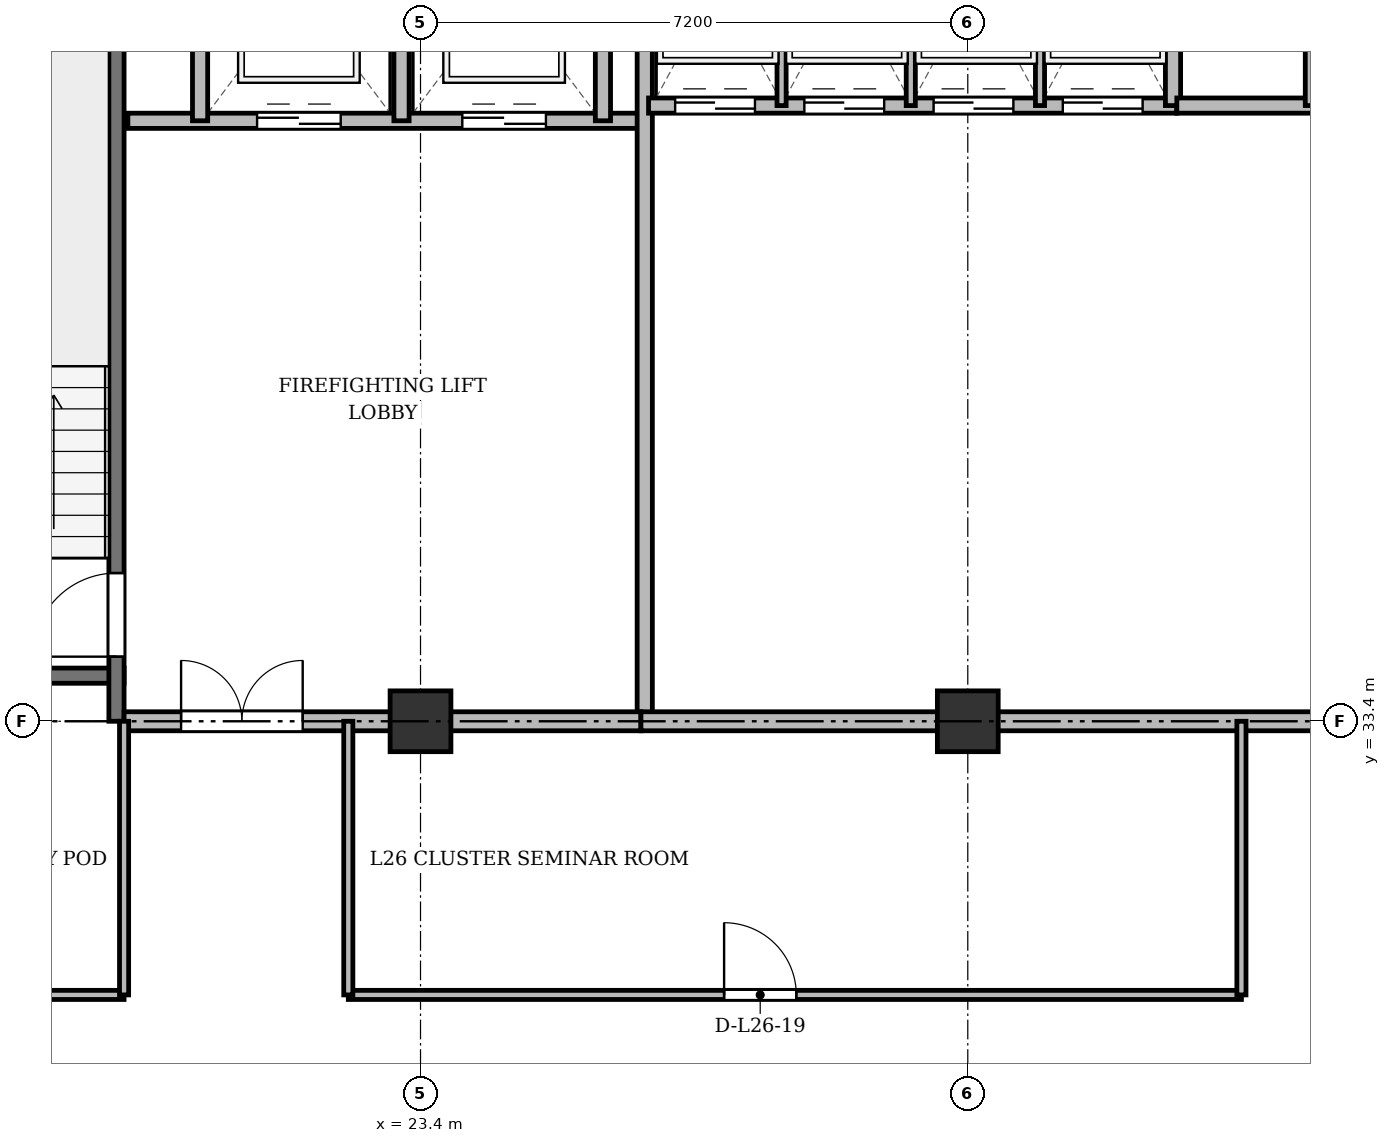
"""IFC4 building model, lengths in metres.
Left out: names, types, materials, properties, quantities, classifications, styles, units other than length and angle.
Written with IfcOpenShell. Run it as: python <this file> out.ifc"""

import sys

from ifc_helpers import new_model, si_unit, direction, frame, frame_2d, origin, origin_2d, place, context, subcontext, project, spatial, rectangle, extrude, source, transform, mapped, element, fill, save


model = new_model("IFC4")
c1 = context("Model", 3, precision=1e-05, world=origin(), true_north=direction((0.0, 1.0)))
c2 = subcontext(c1, "Body", "Model", "MODEL_VIEW")
j1 = project(units=[si_unit("LENGTHUNIT", "METRE"), si_unit("PLANEANGLEUNIT", "RADIAN")], contexts=[c1])
p1 = place(None, origin())
s1 = spatial("IfcSite", under=j1, at=p1, CompositionType="ELEMENT")
p2 = place(p1, origin())
s2 = spatial("IfcBuilding", under=s1, at=p2, CompositionType="ELEMENT")
p3 = place(p2, frame((0.0, 0.0, 103.3)))
s3 = spatial("IfcBuildingStorey", under=s2, at=p3, CompositionType="ELEMENT", Elevation=103.3)
m1 = source(origin(), c2, "Body", "SweptSolid", [
    extrude(rectangle(XDim=0.8, YDim=0.8, at=origin_2d()), origin(), (0.0, 0.0, 1.0), 3.6),
])
for number, where, z_axis, x_axis in (
    (1, (23.4, 33.4, 0.0), (0.0, 0.0, 1.0), (1.0, 0.0, 0.0)),
    (2, (30.6, 33.4, 0.0), (0.0, 0.0, 1.0), (1.0, 0.0, 0.0)),
):
    element("IfcColumn", number, at=place(p3, frame(where, z_axis=z_axis, x_axis=x_axis)), inside=s3, PredefinedType="COLUMN", context=c2, shape_type="MappedRepresentation", body=[
        mapped(m1, transform((0.0, 0.0, 0.0), x_axis=(1.0, 0.0, 0.0), y_axis=(0.0, 1.0, 0.0), z_axis=(0.0, 0.0, 1.0), scale=1.0)),
    ])
p4 = place(p3, frame((16.1, 34.0, 0.0), z_axis=(0.0, 0.0, 1.0), x_axis=(1.0, 0.0, 0.0)))
e3 = element("IfcWall", 3, at=p4, inside=s3, PredefinedType="SHEAR", context=c2, shape_type="SweptSolid", body=[
    extrude(rectangle(XDim=3.4, YDim=0.2, at=frame_2d((1.7, 0.0))), origin(), (0.0, 0.0, 1.0), 3.34),
])
p5 = place(p3, frame((19.4, 33.4, 0.0), z_axis=(0.0, 0.0, 1.0), x_axis=(0.0, 1.0, 0.0)))
e4 = element("IfcWall", 4, at=p5, inside=s3, PredefinedType="SHEAR", context=c2, shape_type="SweptSolid", body=[
    extrude(rectangle(XDim=11.1, YDim=0.2, at=frame_2d((5.55, 0.0))), origin(), (0.0, 0.0, 1.0), 3.34),
])
p6 = place(p5, frame((0.85, 0.0, 0.0)))
e5 = element("IfcOpeningElement", 5, at=p6, cuts=e4, PredefinedType="OPENING", context=c2, shape_type="SweptSolid", body=[
    extrude(rectangle(XDim=1.1, YDim=2.15, at=frame_2d((0.55, 1.075))), frame((0.0, 0.11, 0.0), z_axis=(0.0, -1.0, 0.0), x_axis=(1.0, 0.0, 0.0)), (0.0, 0.0, 1.0), 0.22),
])
p7 = place(p3, frame((19.55, 41.3, 0.0), z_axis=(0.0, 0.0, 1.0), x_axis=(1.0, 0.0, 0.0)))
e6 = element("IfcWall", 6, at=p7, inside=s3, PredefinedType="SOLIDWALL", context=c2, shape_type="SweptSolid", body=[
    extrude(rectangle(XDim=6.75, YDim=0.2, at=frame_2d((3.375, 0.0))), origin(), (0.0, 0.0, 1.0), 3.34),
])
p8 = place(p7, frame((1.7, 0.0, 0.0)))
e7 = element("IfcOpeningElement", 7, at=p8, cuts=e6, PredefinedType="OPENING", context=c2, shape_type="SweptSolid", body=[
    extrude(rectangle(XDim=1.1, YDim=2.15, at=frame_2d((0.55, 1.075))), frame((0.0, 0.11, 0.0), z_axis=(0.0, -1.0, 0.0), x_axis=(1.0, 0.0, 0.0)), (0.0, 0.0, 1.0), 0.22),
])
p9 = place(p7, frame((4.4, 0.0, 0.0)))
e8 = element("IfcOpeningElement", 8, at=p9, cuts=e6, PredefinedType="OPENING", context=c2, shape_type="SweptSolid", body=[
    extrude(rectangle(XDim=1.1, YDim=2.15, at=frame_2d((0.55, 1.075))), frame((0.0, 0.11, 0.0), z_axis=(0.0, -1.0, 0.0), x_axis=(1.0, 0.0, 0.0)), (0.0, 0.0, 1.0), 0.22),
])
for number, where, z_axis, x_axis in (
    (9, (20.5, 41.3, 0.0), (0.0, 0.0, 1.0), (0.0, 1.0, 0.0)),
    (10, (23.15, 41.3, 0.0), (0.0, 0.0, 1.0), (0.0, 1.0, 0.0)),
    (11, (25.8, 41.3, 0.0), (0.0, 0.0, 1.0), (0.0, 1.0, 0.0)),
):
    element("IfcWall", number, at=place(p3, frame(where, z_axis=z_axis, x_axis=x_axis)), inside=s3, PredefinedType="SOLIDWALL", context=c2, shape_type="SweptSolid", body=[
        extrude(rectangle(XDim=3.4, YDim=0.2, at=frame_2d((1.7, 0.0))), origin(), (0.0, 0.0, 1.0), 3.34),
    ])
p10 = place(p3, frame((26.35, 33.4, 0.0), z_axis=(0.0, 0.0, 1.0), x_axis=(0.0, 1.0, 0.0)))
e12 = element("IfcWall", 12, at=p10, inside=s3, PredefinedType="SOLIDWALL", context=c2, shape_type="SweptSolid", body=[
    extrude(rectangle(XDim=11.3, YDim=0.2, at=frame_2d((5.65, 0.0))), origin(), (0.0, 0.0, 1.0), 2.752),
])
p11 = place(p3, frame((19.5, 33.4, 0.0), z_axis=(0.0, 0.0, 1.0), x_axis=(1.0, 0.0, 0.0)))
e13 = element("IfcWall", 13, at=p11, inside=s3, PredefinedType="PARTITIONING", context=c2, shape_type="SweptSolid", body=[
    extrude(rectangle(XDim=6.8, YDim=0.25, at=frame_2d((3.4, 0.0))), origin(), (0.0, 0.0, 1.0), 2.752),
])
p12 = place(p11, frame((0.75, 0.0, 0.0)))
e14 = element("IfcOpeningElement", 14, at=p12, cuts=e13, PredefinedType="OPENING", context=c2, shape_type="SweptSolid", body=[
    extrude(rectangle(XDim=1.6, YDim=2.2, at=frame_2d((0.8, 1.1))), frame((0.0, 0.135, 0.0), z_axis=(0.0, -1.0, 0.0), x_axis=(1.0, 0.0, 0.0)), (0.0, 0.0, 1.0), 0.27),
])
p13 = place(p3, frame((26.4, 41.5, 0.0), z_axis=(0.0, 0.0, 1.0), x_axis=(1.0, 0.0, 0.0)))
e15 = element("IfcWall", 15, at=p13, inside=s3, PredefinedType="SOLIDWALL", context=c2, shape_type="SweptSolid", body=[
    extrude(rectangle(XDim=6.95, YDim=0.2, at=frame_2d((3.475, 0.0))), origin(), (0.0, 0.0, 1.0), 3.34),
])
p14 = place(p13, frame((0.35, 0.0, 0.0)))
e16 = element("IfcOpeningElement", 16, at=p14, cuts=e15, PredefinedType="OPENING", context=c2, shape_type="SweptSolid", body=[
    extrude(rectangle(XDim=1.05, YDim=2.15, at=frame_2d((0.525, 1.075))), frame((0.0, 0.11, 0.0), z_axis=(0.0, -1.0, 0.0), x_axis=(1.0, 0.0, 0.0)), (0.0, 0.0, 1.0), 0.22),
])
p15 = place(p13, frame((2.05, 0.0, 0.0)))
e17 = element("IfcOpeningElement", 17, at=p15, cuts=e15, PredefinedType="OPENING", context=c2, shape_type="SweptSolid", body=[
    extrude(rectangle(XDim=1.05, YDim=2.15, at=frame_2d((0.525, 1.075))), frame((0.0, 0.11, 0.0), z_axis=(0.0, -1.0, 0.0), x_axis=(1.0, 0.0, 0.0)), (0.0, 0.0, 1.0), 0.22),
])
p16 = place(p13, frame((3.75, 0.0, 0.0)))
e18 = element("IfcOpeningElement", 18, at=p16, cuts=e15, PredefinedType="OPENING", context=c2, shape_type="SweptSolid", body=[
    extrude(rectangle(XDim=1.05, YDim=2.15, at=frame_2d((0.525, 1.075))), frame((0.0, 0.11, 0.0), z_axis=(0.0, -1.0, 0.0), x_axis=(1.0, 0.0, 0.0)), (0.0, 0.0, 1.0), 0.22),
])
p17 = place(p13, frame((5.45, 0.0, 0.0)))
e19 = element("IfcOpeningElement", 19, at=p17, cuts=e15, PredefinedType="OPENING", context=c2, shape_type="SweptSolid", body=[
    extrude(rectangle(XDim=1.05, YDim=2.15, at=frame_2d((0.525, 1.075))), frame((0.0, 0.11, 0.0), z_axis=(0.0, -1.0, 0.0), x_axis=(1.0, 0.0, 0.0)), (0.0, 0.0, 1.0), 0.22),
])
p18 = place(p3, frame((33.3, 41.5, 0.0), z_axis=(0.0, 0.0, 1.0), x_axis=(0.0, 1.0, 0.0)))
e20 = element("IfcWall", 20, at=p18, inside=s3, PredefinedType="SOLIDWALL", context=c2, shape_type="SweptSolid", body=[
    extrude(rectangle(XDim=3.2, YDim=0.2, at=frame_2d((1.6, 0.0))), origin(), (0.0, 0.0, 1.0), 3.34),
])
for number, where, z_axis, x_axis in (
    (21, (28.15, 41.5, 0.0), (0.0, 0.0, 1.0), (0.0, 1.0, 0.0)),
    (22, (29.85, 41.5, 0.0), (0.0, 0.0, 1.0), (0.0, 1.0, 0.0)),
    (23, (31.55, 41.5, 0.0), (0.0, 0.0, 1.0), (0.0, 1.0, 0.0)),
):
    element("IfcWall", number, at=place(p3, frame(where, z_axis=z_axis, x_axis=x_axis)), inside=s3, PredefinedType="PARTITIONING", context=c2, shape_type="SweptSolid", body=[
        extrude(rectangle(XDim=3.2, YDim=0.12, at=frame_2d((1.6, 0.0))), origin(), (0.0, 0.0, 1.0), 3.34),
    ])
p19 = place(p3, frame((33.35, 41.5, 0.0), z_axis=(0.0, 0.0, 1.0), x_axis=(1.0, 0.0, 0.0)))
e24 = element("IfcWall", 24, at=p19, inside=s3, PredefinedType="SOLIDWALL", context=c2, shape_type="SweptSolid", body=[
    extrude(rectangle(XDim=6.9, YDim=0.2, at=frame_2d((3.45, 0.0))), origin(), (0.0, 0.0, 1.0), 3.34),
])
p20 = place(p3, frame((35.1, 41.5, 0.0), z_axis=(0.0, 0.0, 1.0), x_axis=(0.0, 1.0, 0.0)))
e25 = element("IfcWall", 25, at=p20, inside=s3, PredefinedType="PARTITIONING", context=c2, shape_type="SweptSolid", body=[
    extrude(rectangle(XDim=3.2, YDim=0.12, at=frame_2d((1.6, 0.0))), origin(), (0.0, 0.0, 1.0), 3.34),
])
p21 = place(p3, frame((26.3, 33.4, 0.0), z_axis=(0.0, 0.0, 1.0), x_axis=(1.0, 0.0, 0.0)))
e26 = element("IfcWall", 26, at=p21, inside=s3, PredefinedType="PARTITIONING", context=c2, shape_type="SweptSolid", body=[
    extrude(rectangle(XDim=20.85, YDim=0.25, at=frame_2d((10.425, 0.0))), origin(), (0.0, 0.0, 1.0), 2.752),
])
p22 = place(p21, frame((9.2, 0.0, 0.0)))
e27 = element("IfcOpeningElement", 27, at=p22, cuts=e26, PredefinedType="OPENING", context=c2, shape_type="SweptSolid", body=[
    extrude(rectangle(XDim=1.6, YDim=2.2, at=frame_2d((0.8, 1.1))), frame((0.0, 0.135, 0.0), z_axis=(0.0, -1.0, 0.0), x_axis=(1.0, 0.0, 0.0)), (0.0, 0.0, 1.0), 0.27),
])
p23 = place(p3, frame((4.75, 29.8, 0.0), z_axis=(0.0, 0.0, 1.0), x_axis=(1.0, 0.0, 0.0)))
e28 = element("IfcWall", 28, at=p23, inside=s3, PredefinedType="PARTITIONING", context=c2, shape_type="SweptSolid", body=[
    extrude(rectangle(XDim=14.75, YDim=0.12, at=frame_2d((7.375, 0.0))), origin(), (0.0, 0.0, 1.0), 2.84),
])
p24 = place(p23, frame((6.9, 0.0, 0.0)))
e29 = element("IfcOpeningElement", 29, at=p24, cuts=e28, PredefinedType="OPENING", context=c2, shape_type="SweptSolid", body=[
    extrude(rectangle(XDim=0.95, YDim=2.15, at=frame_2d((0.475, 1.075))), frame((0.0, 0.07, 0.0), z_axis=(0.0, -1.0, 0.0), x_axis=(1.0, 0.0, 0.0)), (0.0, 0.0, 1.0), 0.14),
])
p25 = place(p3, frame((22.45, 29.8, 0.0), z_axis=(0.0, 0.0, 1.0), x_axis=(1.0, 0.0, 0.0)))
e30 = element("IfcWall", 30, at=p25, inside=s3, PredefinedType="PARTITIONING", context=c2, shape_type="SweptSolid", body=[
    extrude(rectangle(XDim=11.75, YDim=0.12, at=frame_2d((5.875, 0.0))), origin(), (0.0, 0.0, 1.0), 2.84),
])
p26 = place(p25, frame((4.944, 0.0, 0.0)))
e31 = element("IfcOpeningElement", 31, at=p26, cuts=e30, PredefinedType="OPENING", context=c2, shape_type="SweptSolid", body=[
    extrude(rectangle(XDim=0.95, YDim=2.15, at=frame_2d((0.475, 1.075))), frame((0.0, 0.07, 0.0), z_axis=(0.0, -1.0, 0.0), x_axis=(1.0, 0.0, 0.0)), (0.0, 0.0, 1.0), 0.14),
])
for number, where, z_axis, x_axis in (
    (32, (19.5, 29.8, 0.0), (0.0, 0.0, 1.0), (0.0, 1.0, 0.0)),
    (33, (22.45, 29.8, 0.0), (0.0, 0.0, 1.0), (0.0, 1.0, 0.0)),
    (34, (34.2, 29.8, 0.0), (0.0, 0.0, 1.0), (0.0, 1.0, 0.0)),
):
    element("IfcWall", number, at=place(p3, frame(where, z_axis=z_axis, x_axis=x_axis)), inside=s3, PredefinedType="PARTITIONING", context=c2, shape_type="SweptSolid", body=[
        extrude(rectangle(XDim=3.6, YDim=0.12, at=frame_2d((1.8, 0.0))), origin(), (0.0, 0.0, 1.0), 2.752),
    ])
m2 = source(origin(), c2, "Body", "SweptSolid", [
    extrude(rectangle(XDim=1.1, YDim=2.15, at=frame_2d((0.55, 1.075))), frame((0.0, 0.025, 0.0), z_axis=(0.0, -1.0, 0.0), x_axis=(1.0, 0.0, 0.0)), (0.0, 0.0, 1.0), 0.05),
])
p27 = place(p6, origin())
e35 = element("IfcDoor", 35, at=p27, inside=s3, OperationType="SINGLE_SWING_LEFT", PredefinedType="DOOR", context=c2, shape_type="MappedRepresentation", body=[
    mapped(m2, transform((0.0, 0.0, 0.0), x_axis=(1.0, 0.0, 0.0), y_axis=(0.0, 1.0, 0.0), z_axis=(0.0, 0.0, 1.0), scale=1.0)),
])
fill(e5, e35)
p28 = place(p8, origin())
e36 = element("IfcDoor", 36, at=p28, inside=s3, OperationType="DOUBLE_DOOR_SLIDING", PredefinedType="DOOR", context=c2, shape_type="MappedRepresentation", body=[
    mapped(m2, transform((0.0, 0.0, 0.0), x_axis=(1.0, 0.0, 0.0), y_axis=(0.0, 1.0, 0.0), z_axis=(0.0, 0.0, 1.0), scale=1.0)),
])
fill(e7, e36)
p29 = place(p9, origin())
e37 = element("IfcDoor", 37, at=p29, inside=s3, OperationType="DOUBLE_DOOR_SLIDING", PredefinedType="DOOR", context=c2, shape_type="MappedRepresentation", body=[
    mapped(m2, transform((0.0, 0.0, 0.0), x_axis=(1.0, 0.0, 0.0), y_axis=(0.0, 1.0, 0.0), z_axis=(0.0, 0.0, 1.0), scale=1.0)),
])
fill(e8, e37)
m3 = source(origin(), c2, "Body", "SweptSolid", [
    extrude(rectangle(XDim=1.6, YDim=2.2, at=frame_2d((0.8, 1.1))), frame((0.0, 0.025, 0.0), z_axis=(0.0, -1.0, 0.0), x_axis=(1.0, 0.0, 0.0)), (0.0, 0.0, 1.0), 0.05),
])
p30 = place(p12, origin())
e38 = element("IfcDoor", 38, at=p30, inside=s3, OperationType="DOUBLE_DOOR_SINGLE_SWING", PredefinedType="DOOR", context=c2, shape_type="MappedRepresentation", body=[
    mapped(m3, transform((0.0, 0.0, 0.0), x_axis=(1.0, 0.0, 0.0), y_axis=(0.0, 1.0, 0.0), z_axis=(0.0, 0.0, 1.0), scale=1.0)),
])
fill(e14, e38)
m4 = source(origin(), c2, "Body", "SweptSolid", [
    extrude(rectangle(XDim=1.05, YDim=2.15, at=frame_2d((0.525, 1.075))), frame((0.0, 0.025, 0.0), z_axis=(0.0, -1.0, 0.0), x_axis=(1.0, 0.0, 0.0)), (0.0, 0.0, 1.0), 0.05),
])
p31 = place(p14, origin())
e39 = element("IfcDoor", 39, at=p31, inside=s3, OperationType="DOUBLE_DOOR_SLIDING", PredefinedType="DOOR", context=c2, shape_type="MappedRepresentation", body=[
    mapped(m4, transform((0.0, 0.0, 0.0), x_axis=(1.0, 0.0, 0.0), y_axis=(0.0, 1.0, 0.0), z_axis=(0.0, 0.0, 1.0), scale=1.0)),
])
fill(e16, e39)
p32 = place(p15, origin())
e40 = element("IfcDoor", 40, at=p32, inside=s3, OperationType="DOUBLE_DOOR_SLIDING", PredefinedType="DOOR", context=c2, shape_type="MappedRepresentation", body=[
    mapped(m4, transform((0.0, 0.0, 0.0), x_axis=(1.0, 0.0, 0.0), y_axis=(0.0, 1.0, 0.0), z_axis=(0.0, 0.0, 1.0), scale=1.0)),
])
fill(e17, e40)
p33 = place(p16, origin())
e41 = element("IfcDoor", 41, at=p33, inside=s3, OperationType="DOUBLE_DOOR_SLIDING", PredefinedType="DOOR", context=c2, shape_type="MappedRepresentation", body=[
    mapped(m4, transform((0.0, 0.0, 0.0), x_axis=(1.0, 0.0, 0.0), y_axis=(0.0, 1.0, 0.0), z_axis=(0.0, 0.0, 1.0), scale=1.0)),
])
fill(e18, e41)
p34 = place(p17, origin())
e42 = element("IfcDoor", 42, at=p34, inside=s3, OperationType="DOUBLE_DOOR_SLIDING", PredefinedType="DOOR", context=c2, shape_type="MappedRepresentation", body=[
    mapped(m4, transform((0.0, 0.0, 0.0), x_axis=(1.0, 0.0, 0.0), y_axis=(0.0, 1.0, 0.0), z_axis=(0.0, 0.0, 1.0), scale=1.0)),
])
fill(e19, e42)
m5 = source(origin(), c2, "Body", "SweptSolid", [
    extrude(rectangle(XDim=0.95, YDim=2.15, at=frame_2d((0.475, 1.075))), frame((0.0, 0.025, 0.0), z_axis=(0.0, -1.0, 0.0), x_axis=(1.0, 0.0, 0.0)), (0.0, 0.0, 1.0), 0.05),
])
p35 = place(p26, origin())
e43 = element("IfcDoor", 43, at=p35, inside=s3, OperationType="SINGLE_SWING_LEFT", PredefinedType="DOOR", context=c2, shape_type="MappedRepresentation", body=[
    mapped(m5, transform((0.0, 0.0, 0.0), x_axis=(1.0, 0.0, 0.0), y_axis=(0.0, 1.0, 0.0), z_axis=(0.0, 0.0, 1.0), scale=1.0)),
])
fill(e31, e43)
save(model, sys.argv[1])
